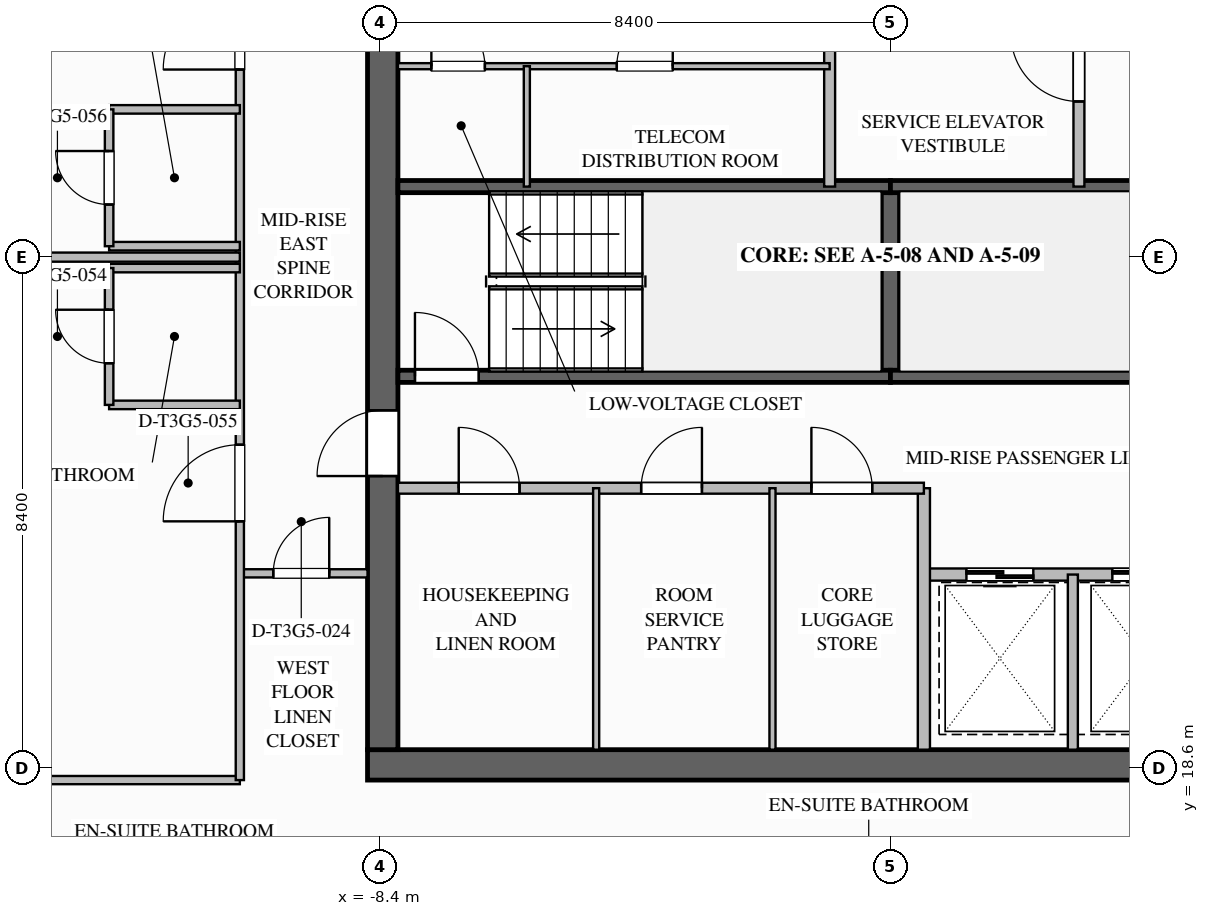
"""IFC4 building model, lengths in metres.
Left out: names, types, materials, properties, quantities, classifications, styles, units other than length and angle.
Written with IfcOpenShell. Run it as: python <this file> out.ifc"""

import sys

from ifc_helpers import new_model, si_unit, direction, frame, frame_2d, origin, place, context, subcontext, project, spatial, rectangle, extrude, element, fill, save


model = new_model("IFC4")
c1 = context("Model", 3, precision=1e-05, world=origin(), true_north=direction((0.0, 1.0)))
c2 = subcontext(c1, "Body", "Model", "MODEL_VIEW")
j1 = project(units=[si_unit("LENGTHUNIT", "METRE"), si_unit("PLANEANGLEUNIT", "RADIAN")], contexts=[c1])
p1 = place(None, origin())
s1 = spatial("IfcSite", under=j1, at=p1, CompositionType="ELEMENT")
p2 = place(p1, origin())
s2 = spatial("IfcBuilding", under=s1, at=p2, CompositionType="ELEMENT")
p3 = place(p2, frame((0.0, 0.0, 193.0)))
s3 = spatial("IfcBuildingStorey", under=s2, at=p3, CompositionType="ELEMENT", Elevation=193.0)
p4 = place(p3, frame((8.6, 18.65, 0.0), z_axis=(0.0, 0.0, 1.0), x_axis=(-1.0, 0.0, 0.0)))
e1 = element("IfcWall", 1, at=p4, inside=s3, PredefinedType="SHEAR", context=c2, shape_type="SweptSolid", body=[
    extrude(rectangle(XDim=17.2, YDim=0.5, at=frame_2d((8.6, 0.0))), origin(), (0.0, 0.0, 1.0), 3.55),
])
p5 = place(p3, frame((-8.35, 18.9, 0.0), z_axis=(0.0, 0.0, 1.0), x_axis=(0.0, 1.0, 0.0)))
e2 = element("IfcWall", 2, at=p5, inside=s3, PredefinedType="SHEAR", context=c2, shape_type="SweptSolid", body=[
    extrude(rectangle(XDim=16.2, YDim=0.5, at=frame_2d((8.1, 0.0))), origin(), (0.0, 0.0, 1.0), 3.55),
])
p6 = place(p5, frame((12.02, 0.0, 0.0)))
e3 = element("IfcOpeningElement", 3, at=p6, cuts=e2, PredefinedType="OPENING", context=c2, shape_type="SweptSolid", body=[
    extrude(rectangle(XDim=1.08, YDim=2.04, at=frame_2d((0.54, 1.02))), frame((0.0, 0.26, 0.0), z_axis=(0.0, -1.0, 0.0), x_axis=(1.0, 0.0, 0.0)), (0.0, 0.0, 1.0), 0.52),
])
p7 = place(p5, frame((4.5, 0.0, 0.0)))
e4 = element("IfcOpeningElement", 4, at=p7, cuts=e2, PredefinedType="OPENING", context=c2, shape_type="SweptSolid", body=[
    extrude(rectangle(XDim=1.08, YDim=2.04, at=frame_2d((0.54, 1.02))), frame((0.0, 0.26, 0.0), z_axis=(0.0, -1.0, 0.0), x_axis=(1.0, 0.0, 0.0)), (0.0, 0.0, 1.0), 0.52),
])
p8 = place(p3, frame((0.0, 25.04, 0.0), z_axis=(0.0, 0.0, 1.0), x_axis=(0.0, 1.0, 0.0)))
e5 = element("IfcWall", 5, at=p8, inside=s3, PredefinedType="SOLIDWALL", context=c2, shape_type="SweptSolid", body=[
    extrude(rectangle(XDim=3.12, YDim=0.3, at=frame_2d((1.56, 0.0))), origin(), (0.0, 0.0, 1.0), 3.29),
])
p9 = place(p3, frame((-8.1, 25.04, 0.0), z_axis=(0.0, 0.0, 1.0), x_axis=(1.0, 0.0, 0.0)))
e6 = element("IfcWall", 6, at=p9, inside=s3, PredefinedType="SOLIDWALL", context=c2, shape_type="SweptSolid", body=[
    extrude(rectangle(XDim=8.1, YDim=0.2, at=frame_2d((4.05, 0.0))), origin(), (0.0, 0.0, 1.0), 3.29),
])
p10 = place(p9, frame((0.28, 0.0, 0.0)))
e7 = element("IfcOpeningElement", 7, at=p10, cuts=e6, PredefinedType="OPENING", context=c2, shape_type="SweptSolid", body=[
    extrude(rectangle(XDim=1.05, YDim=2.1, at=frame_2d((0.525, 1.05))), frame((0.0, 0.11, 0.0), z_axis=(0.0, -1.0, 0.0), x_axis=(1.0, 0.0, 0.0)), (0.0, 0.0, 1.0), 0.22),
])
for number, where, z_axis, x_axis in (
    (8, (-8.1, 28.16, 0.0), (0.0, 0.0, 1.0), (1.0, 0.0, 0.0)),
    (9, (0.0, 25.04, 0.0), (0.0, 0.0, 1.0), (1.0, 0.0, 0.0)),
):
    element("IfcWall", number, at=place(p3, frame(where, z_axis=z_axis, x_axis=x_axis)), inside=s3, PredefinedType="SOLIDWALL", context=c2, shape_type="SweptSolid", body=[
        extrude(rectangle(XDim=8.1, YDim=0.2, at=frame_2d((4.05, 0.0))), origin(), (0.0, 0.0, 1.0), 3.29),
    ])
p11 = place(p3, frame((8.1, 28.16, 0.0), z_axis=(0.0, 0.0, 1.0), x_axis=(-1.0, 0.0, 0.0)))
e10 = element("IfcWall", 10, at=p11, inside=s3, PredefinedType="SOLIDWALL", context=c2, shape_type="SweptSolid", body=[
    extrude(rectangle(XDim=8.1, YDim=0.2, at=frame_2d((4.05, 0.0))), origin(), (0.0, 0.0, 1.0), 3.29),
])
p12 = place(p11, frame((0.28, 0.0, 0.0)))
e11 = element("IfcOpeningElement", 11, at=p12, cuts=e10, PredefinedType="OPENING", context=c2, shape_type="SweptSolid", body=[
    extrude(rectangle(XDim=1.05, YDim=2.1, at=frame_2d((0.525, 1.05))), frame((0.0, 0.11, 0.0), z_axis=(0.0, -1.0, 0.0), x_axis=(1.0, 0.0, 0.0)), (0.0, 0.0, 1.0), 0.22),
])
p13 = place(p3, frame((3.1, 28.16, 0.0), z_axis=(0.0, 0.0, 1.0), x_axis=(0.0, 1.0, 0.0)))
e12 = element("IfcWall", 12, at=p13, inside=s3, PredefinedType="SOLIDWALL", context=c2, shape_type="SweptSolid", body=[
    extrude(rectangle(XDim=4.06, YDim=0.18, at=frame_2d((2.03, 0.0))), origin(), (0.0, 0.0, 1.0), 3.29),
])
p14 = place(p13, frame((1.4, 0.0, 0.0)))
e13 = element("IfcOpeningElement", 13, at=p14, cuts=e12, PredefinedType="OPENING", context=c2, shape_type="SweptSolid", body=[
    extrude(rectangle(XDim=1.12, YDim=2.1, at=frame_2d((0.56, 1.05))), frame((0.0, 0.1, 0.0), z_axis=(0.0, -1.0, 0.0), x_axis=(1.0, 0.0, 0.0)), (0.0, 0.0, 1.0), 0.2),
])
p15 = place(p3, frame((-1.0, 28.16, 0.0), z_axis=(0.0, 0.0, 1.0), x_axis=(0.0, 1.0, 0.0)))
e14 = element("IfcWall", 14, at=p15, inside=s3, PredefinedType="SOLIDWALL", context=c2, shape_type="SweptSolid", body=[
    extrude(rectangle(XDim=4.02, YDim=0.18, at=frame_2d((2.01, 0.0))), origin(), (0.0, 0.0, 1.0), 3.29),
])
p16 = place(p15, frame((2.49, 0.0, 0.0)))
e15 = element("IfcOpeningElement", 15, at=p16, cuts=e14, PredefinedType="OPENING", context=c2, shape_type="SweptSolid", body=[
    extrude(rectangle(XDim=1.0, YDim=2.1, at=frame_2d((0.5, 1.05))), frame((0.0, 0.1, 0.0), z_axis=(0.0, -1.0, 0.0), x_axis=(1.0, 0.0, 0.0)), (0.0, 0.0, 1.0), 0.2),
])
p17 = place(p3, frame((-8.1, 30.14, 0.0), z_axis=(0.0, 0.0, 1.0), x_axis=(1.0, 0.0, 0.0)))
e16 = element("IfcWall", 16, at=p17, inside=s3, PredefinedType="PARTITIONING", context=c2, shape_type="SweptSolid", body=[
    extrude(rectangle(XDim=7.1, YDim=0.1, at=frame_2d((3.55, 0.0))), origin(), (0.0, 0.0, 1.0), 3.29),
])
p18 = place(p17, frame((0.55, 0.0, 0.0)))
e17 = element("IfcOpeningElement", 17, at=p18, cuts=e16, PredefinedType="OPENING", context=c2, shape_type="SweptSolid", body=[
    extrude(rectangle(XDim=0.88, YDim=2.1, at=frame_2d((0.44, 1.05))), frame((0.0, 0.06, 0.0), z_axis=(0.0, -1.0, 0.0), x_axis=(1.0, 0.0, 0.0)), (0.0, 0.0, 1.0), 0.12),
])
p19 = place(p17, frame((3.6, 0.0, 0.0)))
e18 = element("IfcOpeningElement", 18, at=p19, cuts=e16, PredefinedType="OPENING", context=c2, shape_type="SweptSolid", body=[
    extrude(rectangle(XDim=0.92, YDim=2.1, at=frame_2d((0.46, 1.05))), frame((0.0, 0.06, 0.0), z_axis=(0.0, -1.0, 0.0), x_axis=(1.0, 0.0, 0.0)), (0.0, 0.0, 1.0), 0.12),
])
p20 = place(p3, frame((-5.98, 28.16, 0.0), z_axis=(0.0, 0.0, 1.0), x_axis=(0.0, 1.0, 0.0)))
e19 = element("IfcWall", 19, at=p20, inside=s3, PredefinedType="PARTITIONING", context=c2, shape_type="SweptSolid", body=[
    extrude(rectangle(XDim=1.98, YDim=0.1, at=frame_2d((0.99, 0.0))), origin(), (0.0, 0.0, 1.0), 3.29),
])
p21 = place(p3, frame((8.1, 21.78, 0.0), z_axis=(0.0, 0.0, 1.0), x_axis=(-1.0, 0.0, 0.0)))
e20 = element("IfcWall", 20, at=p21, inside=s3, PredefinedType="SOLIDWALL", context=c2, shape_type="SweptSolid", body=[
    extrude(rectangle(XDim=7.55, YDim=0.2, at=frame_2d((3.775, 0.0))), origin(), (0.0, 0.0, 1.0), 3.29),
])
p22 = place(p21, frame((5.75, 0.0, 0.0)))
e21 = element("IfcOpeningElement", 21, at=p22, cuts=e20, PredefinedType="OPENING", context=c2, shape_type="SweptSolid", body=[
    extrude(rectangle(XDim=1.1, YDim=2.2, at=frame_2d((0.55, 1.1))), frame((0.0, 0.11, 0.0), z_axis=(0.0, -1.0, 0.0), x_axis=(1.0, 0.0, 0.0)), (0.0, 0.0, 1.0), 0.22),
])
p23 = place(p21, frame((3.35, 0.0, 0.0)))
e22 = element("IfcOpeningElement", 22, at=p23, cuts=e20, PredefinedType="OPENING", context=c2, shape_type="SweptSolid", body=[
    extrude(rectangle(XDim=1.1, YDim=2.2, at=frame_2d((0.55, 1.1))), frame((0.0, 0.11, 0.0), z_axis=(0.0, -1.0, 0.0), x_axis=(1.0, 0.0, 0.0)), (0.0, 0.0, 1.0), 0.22),
])
p24 = place(p21, frame((0.95, 0.0, 0.0)))
e23 = element("IfcOpeningElement", 23, at=p24, cuts=e20, PredefinedType="OPENING", context=c2, shape_type="SweptSolid", body=[
    extrude(rectangle(XDim=1.1, YDim=2.2, at=frame_2d((0.55, 1.1))), frame((0.0, 0.11, 0.0), z_axis=(0.0, -1.0, 0.0), x_axis=(1.0, 0.0, 0.0)), (0.0, 0.0, 1.0), 0.22),
])
p25 = place(p3, frame((0.55, 18.9, 0.0), z_axis=(0.0, 0.0, 1.0), x_axis=(0.0, 1.0, 0.0)))
e24 = element("IfcWall", 24, at=p25, inside=s3, PredefinedType="SOLIDWALL", context=c2, shape_type="SweptSolid", body=[
    extrude(rectangle(XDim=4.3, YDim=0.2, at=frame_2d((2.15, 0.0))), origin(), (0.0, 0.0, 1.0), 3.29),
])
p26 = place(p3, frame((3.0, 18.9, 0.0), z_axis=(0.0, 0.0, 1.0), x_axis=(0.0, 1.0, 0.0)))
e25 = element("IfcWall", 25, at=p26, inside=s3, PredefinedType="PARTITIONING", context=c2, shape_type="SweptSolid", body=[
    extrude(rectangle(XDim=2.88, YDim=0.165, at=frame_2d((1.44, 0.0))), origin(), (0.0, 0.0, 1.0), 3.29),
])
p27 = place(p3, frame((-8.1, 23.2, 0.0), z_axis=(0.0, 0.0, 1.0), x_axis=(1.0, 0.0, 0.0)))
e26 = element("IfcWall", 26, at=p27, inside=s3, PredefinedType="SOLIDWALL", context=c2, shape_type="SweptSolid", body=[
    extrude(rectangle(XDim=8.65, YDim=0.18, at=frame_2d((4.325, 0.0))), origin(), (0.0, 0.0, 1.0), 3.29),
])
p28 = place(p27, frame((1.0, 0.0, 0.0)))
e27 = element("IfcOpeningElement", 27, at=p28, cuts=e26, PredefinedType="OPENING", context=c2, shape_type="SweptSolid", body=[
    extrude(rectangle(XDim=1.0, YDim=2.1, at=frame_2d((0.5, 1.05))), frame((0.0, 0.1, 0.0), z_axis=(0.0, -1.0, 0.0), x_axis=(1.0, 0.0, 0.0)), (0.0, 0.0, 1.0), 0.2),
])
p29 = place(p27, frame((4.0, 0.0, 0.0)))
e28 = element("IfcOpeningElement", 28, at=p29, cuts=e26, PredefinedType="OPENING", context=c2, shape_type="SweptSolid", body=[
    extrude(rectangle(XDim=1.0, YDim=2.1, at=frame_2d((0.5, 1.05))), frame((0.0, 0.1, 0.0), z_axis=(0.0, -1.0, 0.0), x_axis=(1.0, 0.0, 0.0)), (0.0, 0.0, 1.0), 0.2),
])
p30 = place(p27, frame((6.8, 0.0, 0.0)))
e29 = element("IfcOpeningElement", 29, at=p30, cuts=e26, PredefinedType="OPENING", context=c2, shape_type="SweptSolid", body=[
    extrude(rectangle(XDim=1.0, YDim=2.1, at=frame_2d((0.5, 1.05))), frame((0.0, 0.1, 0.0), z_axis=(0.0, -1.0, 0.0), x_axis=(1.0, 0.0, 0.0)), (0.0, 0.0, 1.0), 0.2),
])
for number, where, z_axis, x_axis in (
    (30, (-4.84, 18.9, 0.0), (0.0, 0.0, 1.0), (0.0, 1.0, 0.0)),
    (31, (-1.94, 18.9, 0.0), (0.0, 0.0, 1.0), (0.0, 1.0, 0.0)),
):
    element("IfcWall", number, at=place(p3, frame(where, z_axis=z_axis, x_axis=x_axis)), inside=s3, PredefinedType="PARTITIONING", context=c2, shape_type="SweptSolid", body=[
        extrude(rectangle(XDim=4.3, YDim=0.1, at=frame_2d((2.15, 0.0))), origin(), (0.0, 0.0, 1.0), 3.29),
    ])
p31 = place(p3, frame((-10.7, 21.8, 0.0), z_axis=(0.0, 0.0, 1.0), x_axis=(1.0, 0.0, 0.0)))
e32 = element("IfcWall", 32, at=p31, inside=s3, PredefinedType="PARTITIONING", context=c2, shape_type="SweptSolid", body=[
    extrude(rectangle(XDim=2.1, YDim=0.135, at=frame_2d((1.05, 0.0))), origin(), (0.0, 0.0, 1.0), 3.29),
])
p32 = place(p31, frame((0.55, 0.0, 0.0)))
e33 = element("IfcOpeningElement", 33, at=p32, cuts=e32, PredefinedType="OPENING", context=c2, shape_type="SweptSolid", body=[
    extrude(rectangle(XDim=0.92, YDim=2.1, at=frame_2d((0.46, 1.05))), frame((0.0, 0.077, 0.0), z_axis=(0.0, -1.0, 0.0), x_axis=(1.0, 0.0, 0.0)), (0.0, 0.0, 1.0), 0.155),
])
p33 = place(p3, frame((-16.2, 18.4, 0.0), z_axis=(0.0, 0.0, 1.0), x_axis=(1.0, 0.0, 0.0)))
e34 = element("IfcWall", 34, at=p33, inside=s3, PredefinedType="PARTITIONING", context=c2, shape_type="SweptSolid", body=[
    extrude(rectangle(XDim=5.5, YDim=0.135, at=frame_2d((2.75, 0.0))), origin(), (0.0, 0.0, 1.0), 2.667),
])
p34 = place(p3, frame((-10.7, 18.4, 0.0), z_axis=(0.0, 0.0, 1.0), x_axis=(0.0, 1.0, 0.0)))
e35 = element("IfcWall", 35, at=p34, inside=s3, PredefinedType="PARTITIONING", context=c2, shape_type="SweptSolid", body=[
    extrude(rectangle(XDim=17.2, YDim=0.135, at=frame_2d((8.6, 0.0))), origin(), (0.0, 0.0, 1.0), 3.29),
])
p35 = place(p34, frame((4.255, 0.0, 0.0)))
e36 = element("IfcOpeningElement", 36, at=p35, cuts=e35, PredefinedType="OPENING", context=c2, shape_type="SweptSolid", body=[
    extrude(rectangle(XDim=1.26, YDim=2.2, at=frame_2d((0.63, 1.1))), frame((0.0, 0.077, 0.0), z_axis=(0.0, -1.0, 0.0), x_axis=(1.0, 0.0, 0.0)), (0.0, 0.0, 1.0), 0.155),
])
p36 = place(p34, frame((11.685, 0.0, 0.0)))
e37 = element("IfcOpeningElement", 37, at=p36, cuts=e35, PredefinedType="OPENING", context=c2, shape_type="SweptSolid", body=[
    extrude(rectangle(XDim=1.26, YDim=2.2, at=frame_2d((0.63, 1.1))), frame((0.0, 0.077, 0.0), z_axis=(0.0, -1.0, 0.0), x_axis=(1.0, 0.0, 0.0)), (0.0, 0.0, 1.0), 0.155),
])
p37 = place(p3, frame((-26.2, 27.0, 0.0), z_axis=(0.0, 0.0, 1.0), x_axis=(1.0, 0.0, 0.0)))
e38 = element("IfcWall", 38, at=p37, inside=s3, PredefinedType="PARTITIONING", context=c2, shape_type="SweptSolid", body=[
    extrude(rectangle(XDim=15.5, YDim=0.15, at=frame_2d((7.75, 0.0))), origin(), (0.0, 0.0, 1.0), 2.58),
])
p38 = place(p3, frame((-10.7, 24.57, 0.0), z_axis=(0.0, 0.0, 1.0), x_axis=(-1.0, 0.0, 0.0)))
e39 = element("IfcWall", 39, at=p38, inside=s3, PredefinedType="PLUMBINGWALL", context=c2, shape_type="SweptSolid", body=[
    extrude(rectangle(XDim=2.15, YDim=0.14, at=frame_2d((1.075, 0.0))), origin(), (0.0, 0.0, 1.0), 3.29),
])
p39 = place(p3, frame((-10.7, 26.82, 0.0), z_axis=(0.0, 0.0, 1.0), x_axis=(-1.0, 0.0, 0.0)))
e40 = element("IfcWall", 40, at=p39, inside=s3, PredefinedType="PLUMBINGWALL", context=c2, shape_type="SweptSolid", body=[
    extrude(rectangle(XDim=2.15, YDim=0.14, at=frame_2d((1.075, 0.0))), origin(), (0.0, 0.0, 1.0), 2.667),
])
p40 = place(p3, frame((-12.85, 24.57, 0.0), z_axis=(0.0, 0.0, 1.0), x_axis=(0.0, 1.0, 0.0)))
e41 = element("IfcWall", 41, at=p40, inside=s3, PredefinedType="PLUMBINGWALL", context=c2, shape_type="SweptSolid", body=[
    extrude(rectangle(XDim=2.25, YDim=0.14, at=frame_2d((1.125, 0.0))), origin(), (0.0, 0.0, 1.0), 3.29),
])
p41 = place(p40, frame((0.685, 0.0, 0.0)))
e42 = element("IfcOpeningElement", 42, at=p41, cuts=e41, PredefinedType="OPENING", context=c2, shape_type="SweptSolid", body=[
    extrude(rectangle(XDim=0.88, YDim=2.1, at=frame_2d((0.44, 1.05))), frame((0.0, 0.08, 0.0), z_axis=(0.0, -1.0, 0.0), x_axis=(1.0, 0.0, 0.0)), (0.0, 0.0, 1.0), 0.16),
])
p42 = place(p3, frame((-10.7, 27.18, 0.0), z_axis=(0.0, 0.0, 1.0), x_axis=(-1.0, 0.0, 0.0)))
e43 = element("IfcWall", 43, at=p42, inside=s3, PredefinedType="PLUMBINGWALL", context=c2, shape_type="SweptSolid", body=[
    extrude(rectangle(XDim=2.15, YDim=0.14, at=frame_2d((1.075, 0.0))), origin(), (0.0, 0.0, 1.0), 2.667),
])
p43 = place(p3, frame((-10.7, 29.43, 0.0), z_axis=(0.0, 0.0, 1.0), x_axis=(-1.0, 0.0, 0.0)))
e44 = element("IfcWall", 44, at=p43, inside=s3, PredefinedType="PLUMBINGWALL", context=c2, shape_type="SweptSolid", body=[
    extrude(rectangle(XDim=2.15, YDim=0.14, at=frame_2d((1.075, 0.0))), origin(), (0.0, 0.0, 1.0), 3.29),
])
p44 = place(p3, frame((-12.85, 27.18, 0.0), z_axis=(0.0, 0.0, 1.0), x_axis=(0.0, 1.0, 0.0)))
e45 = element("IfcWall", 45, at=p44, inside=s3, PredefinedType="PLUMBINGWALL", context=c2, shape_type="SweptSolid", body=[
    extrude(rectangle(XDim=2.25, YDim=0.14, at=frame_2d((1.125, 0.0))), origin(), (0.0, 0.0, 1.0), 3.29),
])
p45 = place(p44, frame((0.685, 0.0, 0.0)))
e46 = element("IfcOpeningElement", 46, at=p45, cuts=e45, PredefinedType="OPENING", context=c2, shape_type="SweptSolid", body=[
    extrude(rectangle(XDim=0.88, YDim=2.1, at=frame_2d((0.44, 1.05))), frame((0.0, 0.08, 0.0), z_axis=(0.0, -1.0, 0.0), x_axis=(1.0, 0.0, 0.0)), (0.0, 0.0, 1.0), 0.16),
])
p46 = place(p10, origin())
e47 = element("IfcDoor", 47, at=p46, inside=s3, OperationType="SINGLE_SWING_LEFT", PredefinedType="DOOR", context=c2, shape_type="SweptSolid", body=[
    extrude(rectangle(XDim=1.05, YDim=2.1, at=frame_2d((0.525, 1.05))), frame((0.0, 0.025, 0.0), z_axis=(0.0, -1.0, 0.0), x_axis=(1.0, 0.0, 0.0)), (0.0, 0.0, 1.0), 0.05),
])
fill(e7, e47)
p47 = place(p14, origin())
e48 = element("IfcDoor", 48, at=p47, inside=s3, OperationType="SINGLE_SWING_RIGHT", PredefinedType="DOOR", context=c2, shape_type="SweptSolid", body=[
    extrude(rectangle(XDim=1.12, YDim=2.1, at=frame_2d((0.56, 1.05))), frame((0.0, 0.025, 0.0), z_axis=(0.0, -1.0, 0.0), x_axis=(1.0, 0.0, 0.0)), (0.0, 0.0, 1.0), 0.05),
])
fill(e13, e48)
p48 = place(p18, origin())
e49 = element("IfcDoor", 49, at=p48, inside=s3, OperationType="SINGLE_SWING_LEFT", PredefinedType="DOOR", context=c2, shape_type="SweptSolid", body=[
    extrude(rectangle(XDim=0.88, YDim=2.1, at=frame_2d((0.44, 1.05))), frame((0.0, 0.025, 0.0), z_axis=(0.0, -1.0, 0.0), x_axis=(1.0, 0.0, 0.0)), (0.0, 0.0, 1.0), 0.05),
])
fill(e17, e49)
p49 = place(p19, origin())
e50 = element("IfcDoor", 50, at=p49, inside=s3, OperationType="SINGLE_SWING_RIGHT", PredefinedType="DOOR", context=c2, shape_type="SweptSolid", body=[
    extrude(rectangle(XDim=0.92, YDim=2.1, at=frame_2d((0.46, 1.05))), frame((0.0, 0.025, 0.0), z_axis=(0.0, -1.0, 0.0), x_axis=(1.0, 0.0, 0.0)), (0.0, 0.0, 1.0), 0.05),
])
fill(e18, e50)
p50 = place(p22, origin())
e51 = element("IfcDoor", 51, at=p50, inside=s3, OperationType="SLIDING_TO_LEFT", PredefinedType="DOOR", context=c2, shape_type="SweptSolid", body=[
    extrude(rectangle(XDim=1.1, YDim=2.2, at=frame_2d((0.55, 1.1))), frame((0.0, 0.025, 0.0), z_axis=(0.0, -1.0, 0.0), x_axis=(1.0, 0.0, 0.0)), (0.0, 0.0, 1.0), 0.05),
])
fill(e21, e51)
p51 = place(p23, origin())
e52 = element("IfcDoor", 52, at=p51, inside=s3, OperationType="SLIDING_TO_LEFT", PredefinedType="DOOR", context=c2, shape_type="SweptSolid", body=[
    extrude(rectangle(XDim=1.1, YDim=2.2, at=frame_2d((0.55, 1.1))), frame((0.0, 0.025, 0.0), z_axis=(0.0, -1.0, 0.0), x_axis=(1.0, 0.0, 0.0)), (0.0, 0.0, 1.0), 0.05),
])
fill(e22, e52)
p52 = place(p7, origin())
e53 = element("IfcDoor", 53, at=p52, inside=s3, OperationType="SINGLE_SWING_LEFT", PredefinedType="DOOR", context=c2, shape_type="SweptSolid", body=[
    extrude(rectangle(XDim=1.08, YDim=2.04, at=frame_2d((0.54, 1.02))), frame((0.0, 0.025, 0.0), z_axis=(0.0, -1.0, 0.0), x_axis=(1.0, 0.0, 0.0)), (0.0, 0.0, 1.0), 0.05),
])
fill(e4, e53)
p53 = place(p28, origin())
e54 = element("IfcDoor", 54, at=p53, inside=s3, OperationType="SINGLE_SWING_LEFT", PredefinedType="DOOR", context=c2, shape_type="SweptSolid", body=[
    extrude(rectangle(XDim=1.0, YDim=2.1, at=frame_2d((0.5, 1.05))), frame((0.0, 0.025, 0.0), z_axis=(0.0, -1.0, 0.0), x_axis=(1.0, 0.0, 0.0)), (0.0, 0.0, 1.0), 0.05),
])
fill(e27, e54)
p54 = place(p29, origin())
e55 = element("IfcDoor", 55, at=p54, inside=s3, OperationType="SINGLE_SWING_RIGHT", PredefinedType="DOOR", context=c2, shape_type="SweptSolid", body=[
    extrude(rectangle(XDim=1.0, YDim=2.1, at=frame_2d((0.5, 1.05))), frame((0.0, 0.025, 0.0), z_axis=(0.0, -1.0, 0.0), x_axis=(1.0, 0.0, 0.0)), (0.0, 0.0, 1.0), 0.05),
])
fill(e28, e55)
p55 = place(p30, origin())
e56 = element("IfcDoor", 56, at=p55, inside=s3, OperationType="SINGLE_SWING_LEFT", PredefinedType="DOOR", context=c2, shape_type="SweptSolid", body=[
    extrude(rectangle(XDim=1.0, YDim=2.1, at=frame_2d((0.5, 1.05))), frame((0.0, 0.025, 0.0), z_axis=(0.0, -1.0, 0.0), x_axis=(1.0, 0.0, 0.0)), (0.0, 0.0, 1.0), 0.05),
])
fill(e29, e56)
p56 = place(p32, origin())
e57 = element("IfcDoor", 57, at=p56, inside=s3, OperationType="SINGLE_SWING_RIGHT", PredefinedType="DOOR", context=c2, shape_type="SweptSolid", body=[
    extrude(rectangle(XDim=0.92, YDim=2.1, at=frame_2d((0.46, 1.05))), frame((0.0, 0.025, 0.0), z_axis=(0.0, -1.0, 0.0), x_axis=(1.0, 0.0, 0.0)), (0.0, 0.0, 1.0), 0.05),
])
fill(e33, e57)
p57 = place(p41, origin())
e58 = element("IfcDoor", 58, at=p57, inside=s3, OperationType="SINGLE_SWING_RIGHT", PredefinedType="DOOR", context=c2, shape_type="SweptSolid", body=[
    extrude(rectangle(XDim=0.88, YDim=2.1, at=frame_2d((0.44, 1.05))), frame((0.0, 0.025, 0.0), z_axis=(0.0, -1.0, 0.0), x_axis=(1.0, 0.0, 0.0)), (0.0, 0.0, 1.0), 0.05),
])
fill(e42, e58)
p58 = place(p35, origin())
e59 = element("IfcDoor", 59, at=p58, inside=s3, OperationType="SINGLE_SWING_LEFT", PredefinedType="DOOR", context=c2, shape_type="SweptSolid", body=[
    extrude(rectangle(XDim=1.26, YDim=2.2, at=frame_2d((0.63, 1.1))), frame((0.0, 0.025, 0.0), z_axis=(0.0, -1.0, 0.0), x_axis=(1.0, 0.0, 0.0)), (0.0, 0.0, 1.0), 0.05),
])
fill(e36, e59)
p59 = place(p45, origin())
e60 = element("IfcDoor", 60, at=p59, inside=s3, OperationType="SINGLE_SWING_RIGHT", PredefinedType="DOOR", context=c2, shape_type="SweptSolid", body=[
    extrude(rectangle(XDim=0.88, YDim=2.1, at=frame_2d((0.44, 1.05))), frame((0.0, 0.025, 0.0), z_axis=(0.0, -1.0, 0.0), x_axis=(1.0, 0.0, 0.0)), (0.0, 0.0, 1.0), 0.05),
])
fill(e46, e60)
p60 = place(p36, origin())
e61 = element("IfcDoor", 61, at=p60, inside=s3, OperationType="SINGLE_SWING_LEFT", PredefinedType="DOOR", context=c2, shape_type="SweptSolid", body=[
    extrude(rectangle(XDim=1.26, YDim=2.2, at=frame_2d((0.63, 1.1))), frame((0.0, 0.025, 0.0), z_axis=(0.0, -1.0, 0.0), x_axis=(1.0, 0.0, 0.0)), (0.0, 0.0, 1.0), 0.05),
])
fill(e37, e61)
save(model, sys.argv[1])
